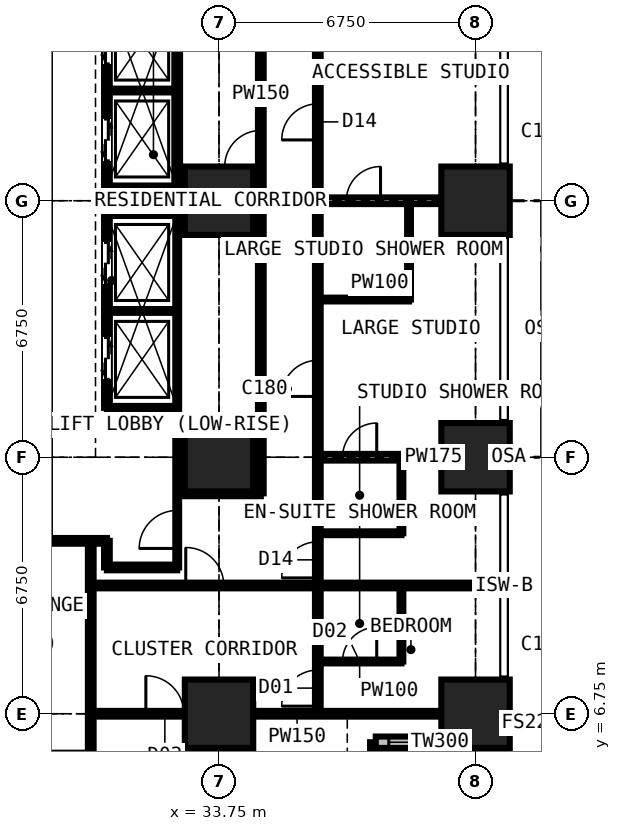
"""IFC4 building model, lengths in metres.
Left out: names, types, materials, properties, quantities, classifications, styles, units other than length and angle.
Written with IfcOpenShell. Run it as: python <this file> out.ifc"""

import sys

from ifc_helpers import new_model, si_unit, direction, frame, frame_2d, origin, origin_2d, place, context, subcontext, project, spatial, rectangle, extrude, element, fill, save


model = new_model("IFC4")
c1 = context("Model", 3, precision=1e-05, world=origin(), true_north=direction((0.0, 1.0)))
c2 = subcontext(c1, "Body", "Model", "MODEL_VIEW")
j1 = project(units=[si_unit("LENGTHUNIT", "METRE"), si_unit("PLANEANGLEUNIT", "RADIAN")], contexts=[c1])
p1 = place(None, origin())
s1 = spatial("IfcSite", under=j1, at=p1, CompositionType="ELEMENT")
p2 = place(p1, origin())
s2 = spatial("IfcBuilding", under=s1, at=p2, CompositionType="ELEMENT")
p3 = place(p2, frame((0.0, 0.0, 105.3)))
s3 = spatial("IfcBuildingStorey", under=s2, at=p3, CompositionType="ELEMENT", Elevation=105.3)
for number, where, z_axis, x_axis in (
    (1, (33.75, 6.75, 0.0), (0.0, 0.0, 1.0), (1.0, 0.0, 0.0)),
    (2, (33.75, 13.5, 0.0), (0.0, 0.0, 1.0), (1.0, 0.0, 0.0)),
    (3, (33.75, 20.25, 0.0), (0.0, 0.0, 1.0), (1.0, 0.0, 0.0)),
    (4, (40.5, 6.75, 0.0), (0.0, 0.0, 1.0), (1.0, 0.0, 0.0)),
    (5, (40.5, 13.5, 0.0), (0.0, 0.0, 1.0), (1.0, 0.0, 0.0)),
    (6, (40.5, 20.25, 0.0), (0.0, 0.0, 1.0), (1.0, 0.0, 0.0)),
):
    element("IfcColumn", number, at=place(p3, frame(where, z_axis=z_axis, x_axis=x_axis)), inside=s3, PredefinedType="COLUMN", context=c2, shape_type="SweptSolid", body=[
        extrude(rectangle(XDim=1.8, YDim=1.8, at=origin_2d()), origin(), (0.0, 0.0, 1.0), 3.6),
    ])
p4 = place(p3, frame((37.875, 2.625, 0.0), z_axis=(0.0, 0.0, 1.0), x_axis=(0.0, 1.0, 0.0)))
e7 = element("IfcWall", 7, at=p4, inside=s3, PredefinedType="SOLIDWALL", context=c2, shape_type="SweptSolid", body=[
    extrude(rectangle(XDim=3.375, YDim=0.3, at=frame_2d((1.688, 0.0))), origin(), (0.0, 0.0, 1.0), 3.375),
])
p5 = place(p4, frame((0.788, 0.0, 0.6)))
e8 = element("IfcOpeningElement", 8, at=p5, cuts=e7, PredefinedType="OPENING", context=c2, shape_type="SweptSolid", body=[
    extrude(rectangle(XDim=1.8, YDim=2.1, at=frame_2d((0.9, 1.05))), frame((0.0, 0.16, 0.0), z_axis=(0.0, -1.0, 0.0), x_axis=(1.0, 0.0, 0.0)), (0.0, 0.0, 1.0), 0.32),
])
p6 = place(p3, frame((37.875, 6.0, 0.0), z_axis=(0.0, 0.0, 1.0), x_axis=(1.0, 0.0, 0.0)))
e9 = element("IfcWall", 9, at=p6, inside=s3, PredefinedType="SOLIDWALL", context=c2, shape_type="SweptSolid", body=[
    extrude(rectangle(XDim=3.375, YDim=0.3, at=frame_2d((1.688, 0.0))), origin(), (0.0, 0.0, 1.0), 3.375),
])
p7 = place(p6, frame((0.343, 0.0, 0.9)))
e10 = element("IfcOpeningElement", 10, at=p7, cuts=e9, PredefinedType="OPENING", context=c2, shape_type="SweptSolid", body=[
    extrude(rectangle(XDim=1.2, YDim=1.8, at=frame_2d((0.6, 0.9))), frame((0.0, 0.16, 0.0), z_axis=(0.0, -1.0, 0.0), x_axis=(1.0, 0.0, 0.0)), (0.0, 0.0, 1.0), 0.32),
])
p8 = place(p3, frame((10.125, 11.3, 0.0), z_axis=(0.0, 0.0, 1.0), x_axis=(1.0, 0.0, 0.0)))
e11 = element("IfcWall", 11, at=p8, inside=s3, PredefinedType="PARTITIONING", context=c2, shape_type="SweptSolid", body=[
    extrude(rectangle(XDim=20.675, YDim=0.15, at=frame_2d((10.337, 0.0))), origin(), (0.0, 0.0, 1.0), 3.375),
])
p9 = place(p8, frame((1.775, 0.0, 0.0)))
e12 = element("IfcOpeningElement", 12, at=p9, cuts=e11, PredefinedType="OPENING", context=c2, shape_type="SweptSolid", body=[
    extrude(rectangle(XDim=1.0, YDim=2.2, at=frame_2d((0.5, 1.1))), frame((0.0, 0.085, 0.0), z_axis=(0.0, -1.0, 0.0), x_axis=(1.0, 0.0, 0.0)), (0.0, 0.0, 1.0), 0.17),
])
p10 = place(p8, frame((11.312, 0.0, 0.0)))
e13 = element("IfcOpeningElement", 13, at=p10, cuts=e11, PredefinedType="OPENING", context=c2, shape_type="SweptSolid", body=[
    extrude(rectangle(XDim=1.0, YDim=2.2, at=frame_2d((0.5, 1.1))), frame((0.0, 0.085, 0.0), z_axis=(0.0, -1.0, 0.0), x_axis=(1.0, 0.0, 0.0)), (0.0, 0.0, 1.0), 0.17),
])
p11 = place(p3, frame((30.375, -0.734, 0.0), z_axis=(0.0, 0.0, 1.0), x_axis=(0.0, 1.0, 0.0)))
e14 = element("IfcWall", 14, at=p11, inside=s3, PredefinedType="PARTITIONING", context=c2, shape_type="SweptSolid", body=[
    extrude(rectangle(XDim=12.034, YDim=0.15, at=frame_2d((6.017, 0.0))), origin(), (0.0, 0.0, 1.0), 3.375),
])
p12 = place(p3, frame((30.375, 6.75, 0.0), z_axis=(0.0, 0.0, 1.0), x_axis=(1.0, 0.0, 0.0)))
e15 = element("IfcWall", 15, at=p12, inside=s3, PredefinedType="PARTITIONING", context=c2, shape_type="SweptSolid", body=[
    extrude(rectangle(XDim=10.859, YDim=0.15, at=frame_2d((5.429, 0.0))), origin(), (0.0, 0.0, 1.0), 2.877),
])
p13 = place(p12, frame((1.45, 0.0, 0.0)))
e16 = element("IfcOpeningElement", 16, at=p13, cuts=e15, PredefinedType="OPENING", context=c2, shape_type="SweptSolid", body=[
    extrude(rectangle(XDim=1.0, YDim=2.2, at=frame_2d((0.5, 1.1))), frame((0.0, 0.085, 0.0), z_axis=(0.0, -1.0, 0.0), x_axis=(1.0, 0.0, 0.0)), (0.0, 0.0, 1.0), 0.17),
])
p14 = place(p3, frame((30.375, 10.125, 0.0), z_axis=(0.0, 0.0, 1.0), x_axis=(1.0, 0.0, 0.0)))
e17 = element("IfcWall", 17, at=p14, inside=s3, PredefinedType="PARTITIONING", context=c2, shape_type="SweptSolid", body=[
    extrude(rectangle(XDim=10.859, YDim=0.15, at=frame_2d((5.429, 0.0))), origin(), (0.0, 0.0, 1.0), 3.375),
])
p15 = place(p14, frame((2.5, 0.0, 0.0)))
e18 = element("IfcOpeningElement", 18, at=p15, cuts=e17, PredefinedType="OPENING", context=c2, shape_type="SweptSolid", body=[
    extrude(rectangle(XDim=1.0, YDim=2.2, at=frame_2d((0.5, 1.1))), frame((0.0, 0.085, 0.0), z_axis=(0.0, -1.0, 0.0), x_axis=(1.0, 0.0, 0.0)), (0.0, 0.0, 1.0), 0.17),
])
p16 = place(p3, frame((30.8, 10.6, 0.0), z_axis=(0.0, 0.0, 1.0), x_axis=(0.0, 1.0, 0.0)))
e19 = element("IfcWall", 19, at=p16, inside=s3, PredefinedType="PARTITIONING", context=c2, shape_type="SweptSolid", body=[
    extrude(rectangle(XDim=0.7, YDim=0.15, at=frame_2d((0.35, 0.0))), origin(), (0.0, 0.0, 1.0), 3.375),
])
p17 = place(p3, frame((30.8, 10.6, 0.0), z_axis=(0.0, 0.0, 1.0), x_axis=(1.0, 0.0, 0.0)))
e20 = element("IfcWall", 20, at=p17, inside=s3, PredefinedType="PARTITIONING", context=c2, shape_type="SweptSolid", body=[
    extrude(rectangle(XDim=1.85, YDim=0.15, at=frame_2d((0.925, 0.0))), origin(), (0.0, 0.0, 1.0), 3.375),
])
p18 = place(p3, frame((30.8, 14.8, 0.0), z_axis=(0.0, 0.0, 1.0), x_axis=(0.0, 1.0, 0.0)))
e21 = element("IfcWall", 21, at=p18, inside=s3, PredefinedType="PARTITIONING", context=c2, shape_type="SweptSolid", body=[
    extrude(rectangle(XDim=10.9, YDim=0.15, at=frame_2d((5.45, 0.0))), origin(), (0.0, 0.0, 1.0), 3.375),
])
p19 = place(p18, frame((0.75, 0.0, 0.0)))
e22 = element("IfcOpeningElement", 22, at=p19, cuts=e21, PredefinedType="OPENING", context=c2, shape_type="SweptSolid", body=[
    extrude(rectangle(XDim=1.1, YDim=2.2, at=frame_2d((0.55, 1.1))), frame((0.0, 0.085, 0.0), z_axis=(0.0, -1.0, 0.0), x_axis=(1.0, 0.0, 0.0)), (0.0, 0.0, 1.0), 0.17),
])
p20 = place(p18, frame((3.25, 0.0, 0.0)))
e23 = element("IfcOpeningElement", 23, at=p20, cuts=e21, PredefinedType="OPENING", context=c2, shape_type="SweptSolid", body=[
    extrude(rectangle(XDim=1.1, YDim=2.2, at=frame_2d((0.55, 1.1))), frame((0.0, 0.085, 0.0), z_axis=(0.0, -1.0, 0.0), x_axis=(1.0, 0.0, 0.0)), (0.0, 0.0, 1.0), 0.17),
])
p21 = place(p18, frame((6.5, 0.0, 0.0)))
e24 = element("IfcOpeningElement", 24, at=p21, cuts=e21, PredefinedType="OPENING", context=c2, shape_type="SweptSolid", body=[
    extrude(rectangle(XDim=1.1, YDim=2.2, at=frame_2d((0.55, 1.1))), frame((0.0, 0.085, 0.0), z_axis=(0.0, -1.0, 0.0), x_axis=(1.0, 0.0, 0.0)), (0.0, 0.0, 1.0), 0.17),
])
p22 = place(p18, frame((9.05, 0.0, 0.0)))
e25 = element("IfcOpeningElement", 25, at=p22, cuts=e21, PredefinedType="OPENING", context=c2, shape_type="SweptSolid", body=[
    extrude(rectangle(XDim=1.1, YDim=2.2, at=frame_2d((0.55, 1.1))), frame((0.0, 0.085, 0.0), z_axis=(0.0, -1.0, 0.0), x_axis=(1.0, 0.0, 0.0)), (0.0, 0.0, 1.0), 0.17),
])
for number, where, z_axis, x_axis in (
    (26, (30.8, 14.8, 0.0), (0.0, 0.0, 1.0), (1.0, 0.0, 0.0)),
    (27, (30.8, 17.35, 0.0), (0.0, 0.0, 1.0), (1.0, 0.0, 0.0)),
    (28, (30.8, 19.9, 0.0), (0.0, 0.0, 1.0), (1.0, 0.0, 0.0)),
    (29, (30.8, 20.6, 0.0), (0.0, 0.0, 1.0), (1.0, 0.0, 0.0)),
    (30, (30.8, 23.15, 0.0), (0.0, 0.0, 1.0), (1.0, 0.0, 0.0)),
):
    element("IfcWall", number, at=place(p3, frame(where, z_axis=z_axis, x_axis=x_axis)), inside=s3, PredefinedType="SHEAR", context=c2, shape_type="SweptSolid", body=[
        extrude(rectangle(XDim=1.85, YDim=0.1, at=frame_2d((0.925, 0.0))), origin(), (0.0, 0.0, 1.0), 3.375),
    ])
p23 = place(p3, frame((32.65, 10.6, 0.0), z_axis=(0.0, 0.0, 1.0), x_axis=(0.0, 1.0, 0.0)))
e31 = element("IfcWall", 31, at=p23, inside=s3, PredefinedType="SHEAR", context=c2, shape_type="SweptSolid", body=[
    extrude(rectangle(XDim=9.3, YDim=0.1, at=frame_2d((4.65, 0.0))), origin(), (0.0, 0.0, 1.0), 3.375),
])
p24 = place(p23, frame((0.5, 0.0, 0.0)))
e32 = element("IfcOpeningElement", 32, at=p24, cuts=e31, PredefinedType="OPENING", context=c2, shape_type="SweptSolid", body=[
    extrude(rectangle(XDim=1.0, YDim=2.2, at=frame_2d((0.5, 1.1))), frame((0.0, 0.06, 0.0), z_axis=(0.0, -1.0, 0.0), x_axis=(1.0, 0.0, 0.0)), (0.0, 0.0, 1.0), 0.12),
])
p25 = place(p3, frame((32.65, 12.55, 0.0), z_axis=(0.0, 0.0, 1.0), x_axis=(1.0, 0.0, 0.0)))
e33 = element("IfcWall", 33, at=p25, inside=s3, PredefinedType="PARTITIONING", context=c2, shape_type="SweptSolid", body=[
    extrude(rectangle(XDim=2.2, YDim=0.15, at=frame_2d((1.1, 0.0))), origin(), (0.0, 0.0, 1.0), 3.375),
])
p26 = place(p3, frame((32.65, 20.6, 0.0), z_axis=(0.0, 0.0, 1.0), x_axis=(0.0, 1.0, 0.0)))
e34 = element("IfcWall", 34, at=p26, inside=s3, PredefinedType="PARTITIONING", context=c2, shape_type="SweptSolid", body=[
    extrude(rectangle(XDim=5.1, YDim=0.15, at=frame_2d((2.55, 0.0))), origin(), (0.0, 0.0, 1.0), 3.375),
])
p27 = place(p3, frame((34.85, 12.55, 0.0), z_axis=(0.0, 0.0, 1.0), x_axis=(0.0, 1.0, 0.0)))
e35 = element("IfcWall", 35, at=p27, inside=s3, PredefinedType="PARTITIONING", context=c2, shape_type="SweptSolid", body=[
    extrude(rectangle(XDim=17.825, YDim=0.15, at=frame_2d((8.913, 0.0))), origin(), (0.0, 0.0, 1.0), 3.375),
])
p28 = place(p27, frame((8.6, 0.0, 0.0)))
e36 = element("IfcOpeningElement", 36, at=p28, cuts=e35, PredefinedType="OPENING", context=c2, shape_type="SweptSolid", body=[
    extrude(rectangle(XDim=0.95, YDim=2.2, at=frame_2d((0.475, 1.1))), frame((0.0, 0.085, 0.0), z_axis=(0.0, -1.0, 0.0), x_axis=(1.0, 0.0, 0.0)), (0.0, 0.0, 1.0), 0.17),
])
p29 = place(p3, frame((36.35, 6.75, 0.0), z_axis=(0.0, 0.0, 1.0), x_axis=(0.0, 1.0, 0.0)))
e37 = element("IfcWall", 37, at=p29, inside=s3, PredefinedType="PARTITIONING", context=c2, shape_type="SweptSolid", body=[
    extrude(rectangle(XDim=20.25, YDim=0.15, at=frame_2d((10.125, 0.0))), origin(), (0.0, 0.0, 1.0), 3.375),
])
p30 = place(p29, frame((0.2, 0.0, 0.0)))
e38 = element("IfcOpeningElement", 38, at=p30, cuts=e37, PredefinedType="OPENING", context=c2, shape_type="SweptSolid", body=[
    extrude(rectangle(XDim=0.95, YDim=2.2, at=frame_2d((0.475, 1.1))), frame((0.0, 0.085, 0.0), z_axis=(0.0, -1.0, 0.0), x_axis=(1.0, 0.0, 0.0)), (0.0, 0.0, 1.0), 0.17),
])
p31 = place(p29, frame((15.1, 0.0, 0.0)))
e39 = element("IfcOpeningElement", 39, at=p31, cuts=e37, PredefinedType="OPENING", context=c2, shape_type="SweptSolid", body=[
    extrude(rectangle(XDim=0.95, YDim=2.2, at=frame_2d((0.475, 1.1))), frame((0.0, 0.085, 0.0), z_axis=(0.0, -1.0, 0.0), x_axis=(1.0, 0.0, 0.0)), (0.0, 0.0, 1.0), 0.17),
])
p32 = place(p29, frame((8.35, 0.0, 0.0)))
e40 = element("IfcOpeningElement", 40, at=p32, cuts=e37, PredefinedType="OPENING", context=c2, shape_type="SweptSolid", body=[
    extrude(rectangle(XDim=0.95, YDim=2.2, at=frame_2d((0.475, 1.1))), frame((0.0, 0.085, 0.0), z_axis=(0.0, -1.0, 0.0), x_axis=(1.0, 0.0, 0.0)), (0.0, 0.0, 1.0), 0.17),
])
p33 = place(p29, frame((3.575, 0.0, 0.0)))
e41 = element("IfcOpeningElement", 41, at=p33, cuts=e37, PredefinedType="OPENING", context=c2, shape_type="SweptSolid", body=[
    extrude(rectangle(XDim=0.95, YDim=2.2, at=frame_2d((0.475, 1.1))), frame((0.0, 0.085, 0.0), z_axis=(0.0, -1.0, 0.0), x_axis=(1.0, 0.0, 0.0)), (0.0, 0.0, 1.0), 0.17),
])
p34 = place(p3, frame((36.35, 8.125, 0.0), z_axis=(0.0, 0.0, 1.0), x_axis=(1.0, 0.0, 0.0)))
e42 = element("IfcWall", 42, at=p34, inside=s3, PredefinedType="PARTITIONING", context=c2, shape_type="SweptSolid", body=[
    extrude(rectangle(XDim=2.2, YDim=0.1, at=frame_2d((1.1, 0.0))), origin(), (0.0, 0.0, 1.0), 3.375),
])
p35 = place(p34, frame((0.65, 0.0, 0.0)))
e43 = element("IfcOpeningElement", 43, at=p35, cuts=e42, PredefinedType="OPENING", context=c2, shape_type="SweptSolid", body=[
    extrude(rectangle(XDim=0.9, YDim=2.2, at=frame_2d((0.45, 1.1))), frame((0.0, 0.06, 0.0), z_axis=(0.0, -1.0, 0.0), x_axis=(1.0, 0.0, 0.0)), (0.0, 0.0, 1.0), 0.12),
])
p36 = place(p3, frame((36.35, 11.5, 0.0), z_axis=(0.0, 0.0, 1.0), x_axis=(1.0, 0.0, 0.0)))
e44 = element("IfcWall", 44, at=p36, inside=s3, PredefinedType="PARTITIONING", context=c2, shape_type="SweptSolid", body=[
    extrude(rectangle(XDim=2.2, YDim=0.1, at=frame_2d((1.1, 0.0))), origin(), (0.0, 0.0, 1.0), 3.375),
])
p37 = place(p3, frame((36.35, 13.5, 0.0), z_axis=(0.0, 0.0, 1.0), x_axis=(1.0, 0.0, 0.0)))
e45 = element("IfcWall", 45, at=p37, inside=s3, PredefinedType="PARTITIONING", context=c2, shape_type="SweptSolid", body=[
    extrude(rectangle(XDim=4.884, YDim=0.175, at=frame_2d((2.442, 0.0))), origin(), (0.0, 0.0, 1.0), 2.61),
])
p38 = place(p37, frame((0.65, 0.0, 0.0)))
e46 = element("IfcOpeningElement", 46, at=p38, cuts=e45, PredefinedType="OPENING", context=c2, shape_type="SweptSolid", body=[
    extrude(rectangle(XDim=0.9, YDim=2.2, at=frame_2d((0.45, 1.1))), frame((0.0, 0.097, 0.0), z_axis=(0.0, -1.0, 0.0), x_axis=(1.0, 0.0, 0.0)), (0.0, 0.0, 1.0), 0.195),
])
p39 = place(p3, frame((36.35, 17.65, 0.0), z_axis=(0.0, 0.0, 1.0), x_axis=(1.0, 0.0, 0.0)))
e47 = element("IfcWall", 47, at=p39, inside=s3, PredefinedType="PARTITIONING", context=c2, shape_type="SweptSolid", body=[
    extrude(rectangle(XDim=2.4, YDim=0.1, at=frame_2d((1.2, 0.0))), origin(), (0.0, 0.0, 1.0), 3.375),
])
p40 = place(p3, frame((36.35, 20.25, 0.0), z_axis=(0.0, 0.0, 1.0), x_axis=(1.0, 0.0, 0.0)))
e48 = element("IfcWall", 48, at=p40, inside=s3, PredefinedType="PARTITIONING", context=c2, shape_type="SweptSolid", body=[
    extrude(rectangle(XDim=4.884, YDim=0.175, at=frame_2d((2.442, 0.0))), origin(), (0.0, 0.0, 1.0), 2.61),
])
p41 = place(p40, frame((0.75, 0.0, 0.0)))
e49 = element("IfcOpeningElement", 49, at=p41, cuts=e48, PredefinedType="OPENING", context=c2, shape_type="SweptSolid", body=[
    extrude(rectangle(XDim=0.9, YDim=2.2, at=frame_2d((0.45, 1.1))), frame((0.0, 0.097, 0.0), z_axis=(0.0, -1.0, 0.0), x_axis=(1.0, 0.0, 0.0)), (0.0, 0.0, 1.0), 0.195),
])
for number, where, z_axis, x_axis in (
    (50, (38.55, 8.125, 0.0), (0.0, 0.0, 1.0), (0.0, 1.0, 0.0)),
    (51, (38.55, 11.5, 0.0), (0.0, 0.0, 1.0), (0.0, 1.0, 0.0)),
):
    element("IfcWall", number, at=place(p3, frame(where, z_axis=z_axis, x_axis=x_axis)), inside=s3, PredefinedType="PARTITIONING", context=c2, shape_type="SweptSolid", body=[
        extrude(rectangle(XDim=2.0, YDim=0.1, at=frame_2d((1.0, 0.0))), origin(), (0.0, 0.0, 1.0), 3.375),
    ])
p42 = place(p3, frame((38.75, 17.65, 0.0), z_axis=(0.0, 0.0, 1.0), x_axis=(0.0, 1.0, 0.0)))
e52 = element("IfcWall", 52, at=p42, inside=s3, PredefinedType="PARTITIONING", context=c2, shape_type="SweptSolid", body=[
    extrude(rectangle(XDim=2.6, YDim=0.1, at=frame_2d((1.3, 0.0))), origin(), (0.0, 0.0, 1.0), 3.375),
])
p43 = place(p7, origin())
e53 = element("IfcWindow", 53, at=p43, inside=s3, PartitioningType="SINGLE_PANEL", PredefinedType="WINDOW", context=c2, shape_type="SweptSolid", body=[
    extrude(rectangle(XDim=1.2, YDim=1.8, at=frame_2d((0.6, 0.9))), frame((0.0, 0.03, 0.0), z_axis=(0.0, -1.0, 0.0), x_axis=(1.0, 0.0, 0.0)), (0.0, 0.0, 1.0), 0.06),
])
fill(e10, e53)
p44 = place(p13, origin())
e54 = element("IfcDoor", 54, at=p44, inside=s3, OperationType="SINGLE_SWING_LEFT", PredefinedType="DOOR", context=c2, shape_type="SweptSolid", body=[
    extrude(rectangle(XDim=1.0, YDim=2.2, at=frame_2d((0.5, 1.1))), frame((0.0, 0.025, 0.0), z_axis=(0.0, -1.0, 0.0), x_axis=(1.0, 0.0, 0.0)), (0.0, 0.0, 1.0), 0.05),
])
fill(e16, e54)
p45 = place(p30, origin())
e55 = element("IfcDoor", 55, at=p45, inside=s3, OperationType="SINGLE_SWING_LEFT", PredefinedType="DOOR", context=c2, shape_type="SweptSolid", body=[
    extrude(rectangle(XDim=0.95, YDim=2.2, at=frame_2d((0.475, 1.1))), frame((0.0, 0.025, 0.0), z_axis=(0.0, -1.0, 0.0), x_axis=(1.0, 0.0, 0.0)), (0.0, 0.0, 1.0), 0.05),
])
fill(e38, e55)
p46 = place(p35, origin())
e56 = element("IfcDoor", 56, at=p46, inside=s3, OperationType="SINGLE_SWING_RIGHT", PredefinedType="DOOR", context=c2, shape_type="SweptSolid", body=[
    extrude(rectangle(XDim=0.9, YDim=2.2, at=frame_2d((0.45, 1.1))), frame((0.0, 0.025, 0.0), z_axis=(0.0, -1.0, 0.0), x_axis=(1.0, 0.0, 0.0)), (0.0, 0.0, 1.0), 0.05),
])
fill(e43, e56)
p47 = place(p15, origin())
e57 = element("IfcDoor", 57, at=p47, inside=s3, OperationType="SINGLE_SWING_LEFT", PredefinedType="DOOR", context=c2, shape_type="SweptSolid", body=[
    extrude(rectangle(XDim=1.0, YDim=2.2, at=frame_2d((0.5, 1.1))), frame((0.0, 0.025, 0.0), z_axis=(0.0, -1.0, 0.0), x_axis=(1.0, 0.0, 0.0)), (0.0, 0.0, 1.0), 0.05),
])
fill(e18, e57)
p48 = place(p31, origin())
e58 = element("IfcDoor", 58, at=p48, inside=s3, OperationType="SINGLE_SWING_LEFT", PredefinedType="DOOR", context=c2, shape_type="SweptSolid", body=[
    extrude(rectangle(XDim=0.95, YDim=2.2, at=frame_2d((0.475, 1.1))), frame((0.0, 0.025, 0.0), z_axis=(0.0, -1.0, 0.0), x_axis=(1.0, 0.0, 0.0)), (0.0, 0.0, 1.0), 0.05),
])
fill(e39, e58)
p49 = place(p32, origin())
e59 = element("IfcDoor", 59, at=p49, inside=s3, OperationType="SINGLE_SWING_LEFT", PredefinedType="DOOR", context=c2, shape_type="SweptSolid", body=[
    extrude(rectangle(XDim=0.95, YDim=2.2, at=frame_2d((0.475, 1.1))), frame((0.0, 0.025, 0.0), z_axis=(0.0, -1.0, 0.0), x_axis=(1.0, 0.0, 0.0)), (0.0, 0.0, 1.0), 0.05),
])
fill(e40, e59)
p50 = place(p41, origin())
e60 = element("IfcDoor", 60, at=p50, inside=s3, OperationType="SINGLE_SWING_RIGHT", PredefinedType="DOOR", context=c2, shape_type="SweptSolid", body=[
    extrude(rectangle(XDim=0.9, YDim=2.2, at=frame_2d((0.45, 1.1))), frame((0.0, 0.025, 0.0), z_axis=(0.0, -1.0, 0.0), x_axis=(1.0, 0.0, 0.0)), (0.0, 0.0, 1.0), 0.05),
])
fill(e49, e60)
p51 = place(p33, origin())
e61 = element("IfcDoor", 61, at=p51, inside=s3, OperationType="SINGLE_SWING_LEFT", PredefinedType="DOOR", context=c2, shape_type="SweptSolid", body=[
    extrude(rectangle(XDim=0.95, YDim=2.2, at=frame_2d((0.475, 1.1))), frame((0.0, 0.025, 0.0), z_axis=(0.0, -1.0, 0.0), x_axis=(1.0, 0.0, 0.0)), (0.0, 0.0, 1.0), 0.05),
])
fill(e41, e61)
p52 = place(p38, origin())
e62 = element("IfcDoor", 62, at=p52, inside=s3, OperationType="SINGLE_SWING_RIGHT", PredefinedType="DOOR", context=c2, shape_type="SweptSolid", body=[
    extrude(rectangle(XDim=0.9, YDim=2.2, at=frame_2d((0.45, 1.1))), frame((0.0, 0.025, 0.0), z_axis=(0.0, -1.0, 0.0), x_axis=(1.0, 0.0, 0.0)), (0.0, 0.0, 1.0), 0.05),
])
fill(e46, e62)
p53 = place(p24, origin())
e63 = element("IfcDoor", 63, at=p53, inside=s3, OperationType="SINGLE_SWING_LEFT", PredefinedType="DOOR", context=c2, shape_type="SweptSolid", body=[
    extrude(rectangle(XDim=1.0, YDim=2.2, at=frame_2d((0.5, 1.1))), frame((0.0, 0.025, 0.0), z_axis=(0.0, -1.0, 0.0), x_axis=(1.0, 0.0, 0.0)), (0.0, 0.0, 1.0), 0.05),
])
fill(e32, e63)
p54 = place(p28, origin())
e64 = element("IfcDoor", 64, at=p54, inside=s3, OperationType="SINGLE_SWING_LEFT", PredefinedType="DOOR", context=c2, shape_type="SweptSolid", body=[
    extrude(rectangle(XDim=0.95, YDim=2.2, at=frame_2d((0.475, 1.1))), frame((0.0, 0.025, 0.0), z_axis=(0.0, -1.0, 0.0), x_axis=(1.0, 0.0, 0.0)), (0.0, 0.0, 1.0), 0.05),
])
fill(e36, e64)
p55 = place(p19, origin())
e65 = element("IfcDoor", 65, at=p55, inside=s3, OperationType="DOUBLE_DOOR_SLIDING", PredefinedType="DOOR", context=c2, shape_type="SweptSolid", body=[
    extrude(rectangle(XDim=1.1, YDim=2.2, at=frame_2d((0.55, 1.1))), frame((0.0, 0.025, 0.0), z_axis=(0.0, -1.0, 0.0), x_axis=(1.0, 0.0, 0.0)), (0.0, 0.0, 1.0), 0.05),
])
fill(e22, e65)
p56 = place(p20, origin())
e66 = element("IfcDoor", 66, at=p56, inside=s3, OperationType="DOUBLE_DOOR_SLIDING", PredefinedType="DOOR", context=c2, shape_type="SweptSolid", body=[
    extrude(rectangle(XDim=1.1, YDim=2.2, at=frame_2d((0.55, 1.1))), frame((0.0, 0.025, 0.0), z_axis=(0.0, -1.0, 0.0), x_axis=(1.0, 0.0, 0.0)), (0.0, 0.0, 1.0), 0.05),
])
fill(e23, e66)
p57 = place(p21, origin())
e67 = element("IfcDoor", 67, at=p57, inside=s3, OperationType="DOUBLE_DOOR_SLIDING", PredefinedType="DOOR", context=c2, shape_type="SweptSolid", body=[
    extrude(rectangle(XDim=1.1, YDim=2.2, at=frame_2d((0.55, 1.1))), frame((0.0, 0.025, 0.0), z_axis=(0.0, -1.0, 0.0), x_axis=(1.0, 0.0, 0.0)), (0.0, 0.0, 1.0), 0.05),
])
fill(e24, e67)
p58 = place(p22, origin())
e68 = element("IfcDoor", 68, at=p58, inside=s3, OperationType="DOUBLE_DOOR_SLIDING", PredefinedType="DOOR", context=c2, shape_type="SweptSolid", body=[
    extrude(rectangle(XDim=1.1, YDim=2.2, at=frame_2d((0.55, 1.1))), frame((0.0, 0.025, 0.0), z_axis=(0.0, -1.0, 0.0), x_axis=(1.0, 0.0, 0.0)), (0.0, 0.0, 1.0), 0.05),
])
fill(e25, e68)
save(model, sys.argv[1])
